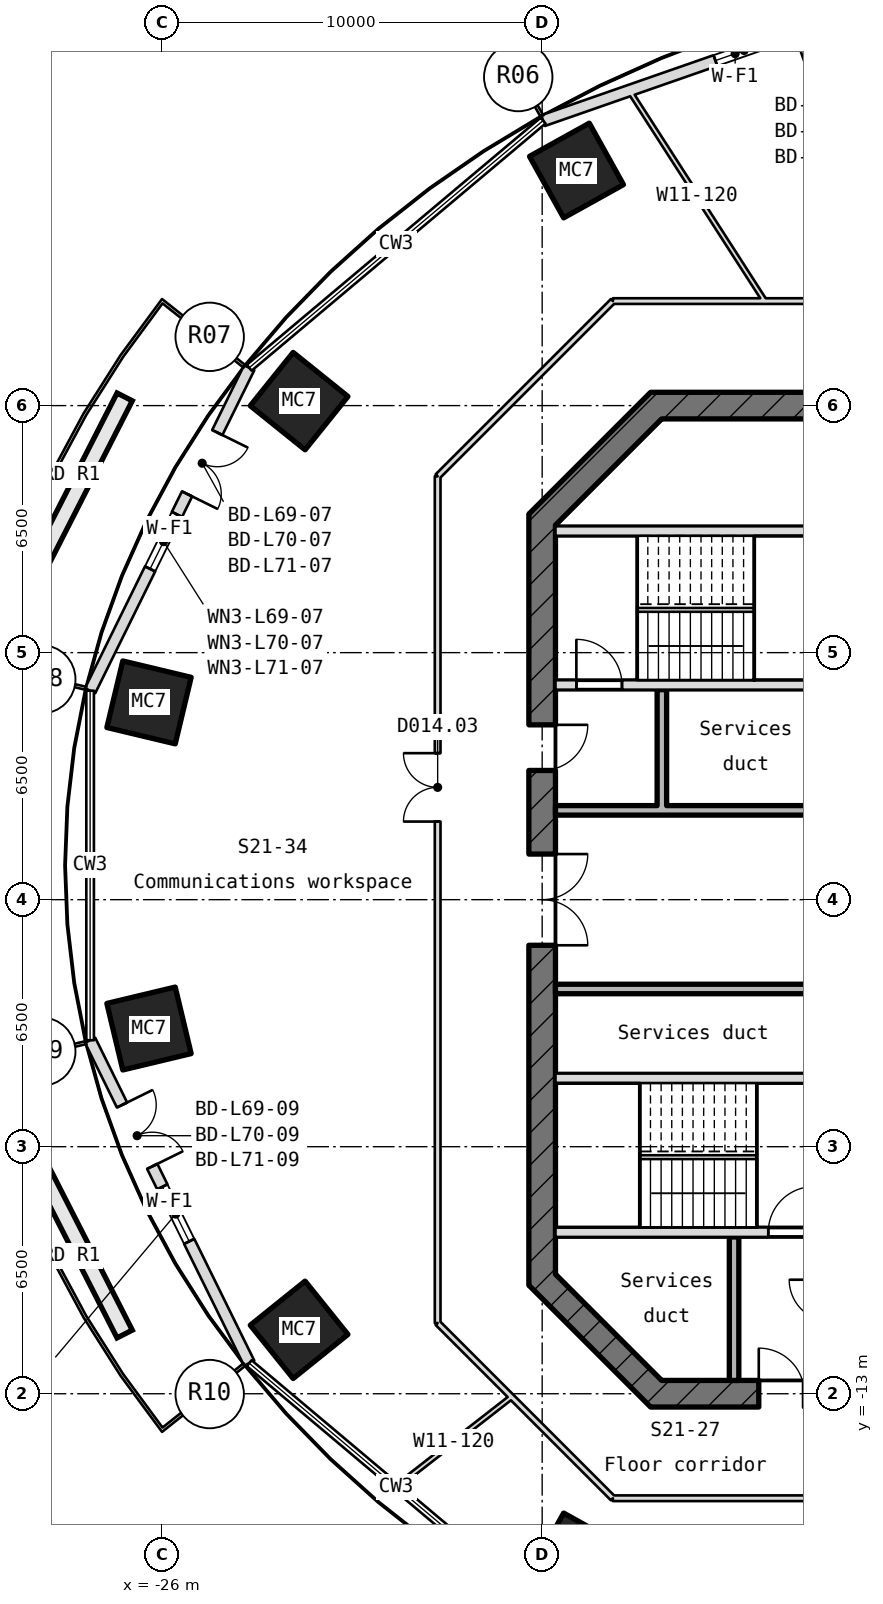
"""IFC4 building model, lengths in metres.
Left out: names, types, materials, properties, quantities, classifications, styles, units other than length and angle.
Written with IfcOpenShell. Run it as: python <this file> out.ifc"""

import sys

from ifc_helpers import new_model, si_unit, direction, frame, frame_2d, origin, origin_2d, place, context, subcontext, project, spatial, rectangle, hollow_rectangle, extrude, element, fill, save


model = new_model("IFC4")
c1 = context("Model", 3, precision=1e-05, world=origin(), true_north=direction((0.0, 1.0)))
c2 = subcontext(c1, "Body", "Model", "MODEL_VIEW")
j1 = project(units=[si_unit("LENGTHUNIT", "METRE"), si_unit("PLANEANGLEUNIT", "RADIAN")], contexts=[c1])
p1 = place(None, origin())
s1 = spatial("IfcSite", under=j1, at=p1, CompositionType="ELEMENT")
p2 = place(p1, origin())
s2 = spatial("IfcBuilding", under=s1, at=p2, CompositionType="ELEMENT")
p3 = place(p2, frame((0.0, 0.0, 309.4)))
s3 = spatial("IfcBuildingStorey", under=s2, at=p3, CompositionType="ELEMENT", Elevation=309.4)
for number, where, z_axis, x_axis in (
    (1, (-15.097, 19.186, -0.18), (0.0, 0.0, 1.0), (0.874, 0.486, 0.0)),
    (2, (-22.396, 13.118, -0.18), (0.0, 0.0, 1.0), (0.626, 0.779, 0.0)),
    (3, (-26.346, 5.19, -0.18), (0.0, 0.0, 1.0), (0.233, 0.973, 0.0)),
    (4, (-26.346, -3.39, -0.18), (0.0, 0.0, 1.0), (-0.233, 0.973, 0.0)),
    (5, (-22.396, -11.318, -0.18), (0.0, 0.0, 1.0), (-0.626, 0.779, 0.0)),
    (6, (-15.097, -17.386, -0.18), (0.0, 0.0, 1.0), (-0.874, 0.486, 0.0)),
):
    element("IfcColumn", number, at=place(p3, frame(where, z_axis=z_axis, x_axis=x_axis)), inside=s3, PredefinedType="COLUMN", context=c2, shape_type="SweptSolid", body=[
        extrude(hollow_rectangle(XDim=1.8, YDim=1.85, WallThickness=0.06, at=origin_2d()), origin(), (0.0, 0.0, 1.0), 4.15),
    ])
p4 = place(p3, frame((-5.869, 24.019, 0.0), z_axis=(0.0, 0.0, 1.0), x_axis=(-0.94436622093, -0.328895790132, 0.0)))
e7 = element("IfcWall", 7, at=p4, inside=s3, PredefinedType="SOLIDWALL", context=c2, shape_type="SweptSolid", body=[
    extrude(rectangle(XDim=10.701, YDim=0.3, at=frame_2d((5.351, 0.0))), origin(), (0.0, 0.0, 1.0), 3.97),
])
p5 = place(p4, frame((1.9, 0.0, 0.0)))
e8 = element("IfcOpeningElement", 8, at=p5, cuts=e7, PredefinedType="OPENING", context=c2, shape_type="SweptSolid", body=[
    extrude(rectangle(XDim=1.8, YDim=2.4, at=frame_2d((0.9, 1.2))), frame((0.0, 0.16, 0.0), z_axis=(0.0, -1.0, 0.0), x_axis=(1.0, 0.0, 0.0)), (0.0, 0.0, 1.0), 0.32),
])
p6 = place(p4, frame((4.3, 0.0, 0.9)))
e9 = element("IfcOpeningElement", 9, at=p6, cuts=e7, PredefinedType="OPENING", context=c2, shape_type="SweptSolid", body=[
    extrude(rectangle(XDim=1.6, YDim=1.5, at=frame_2d((0.8, 0.75))), frame((0.0, 0.16, 0.0), z_axis=(0.0, -1.0, 0.0), x_axis=(1.0, 0.0, 0.0)), (0.0, 0.0, 1.0), 0.32),
])
p7 = place(p3, frame((-23.709, 13.996, 0.0), z_axis=(0.0, 0.0, 1.0), x_axis=(-0.441906476931, -0.89706112704, 0.0)))
e10 = element("IfcWall", 10, at=p7, inside=s3, PredefinedType="SOLIDWALL", context=c2, shape_type="SweptSolid", body=[
    extrude(rectangle(XDim=9.472, YDim=0.3, at=frame_2d((4.736, 0.0))), origin(), (0.0, 0.0, 1.0), 3.97),
])
p8 = place(p7, frame((1.9, 0.0, 0.0)))
e11 = element("IfcOpeningElement", 11, at=p8, cuts=e10, PredefinedType="OPENING", context=c2, shape_type="SweptSolid", body=[
    extrude(rectangle(XDim=1.8, YDim=2.4, at=frame_2d((0.9, 1.2))), frame((0.0, 0.16, 0.0), z_axis=(0.0, -1.0, 0.0), x_axis=(1.0, 0.0, 0.0)), (0.0, 0.0, 1.0), 0.32),
])
p9 = place(p7, frame((4.3, 0.0, 0.9)))
e12 = element("IfcOpeningElement", 12, at=p9, cuts=e10, PredefinedType="OPENING", context=c2, shape_type="SweptSolid", body=[
    extrude(rectangle(XDim=1.6, YDim=1.5, at=frame_2d((0.8, 0.75))), frame((0.0, 0.16, 0.0), z_axis=(0.0, -1.0, 0.0), x_axis=(1.0, 0.0, 0.0)), (0.0, 0.0, 1.0), 0.32),
])
p10 = place(p3, frame((-27.895, -3.699, 0.0), z_axis=(0.0, 0.0, 1.0), x_axis=(0.441906476931, -0.89706112704, 0.0)))
e13 = element("IfcWall", 13, at=p10, inside=s3, PredefinedType="SOLIDWALL", context=c2, shape_type="SweptSolid", body=[
    extrude(rectangle(XDim=9.472, YDim=0.3, at=frame_2d((4.736, 0.0))), origin(), (0.0, 0.0, 1.0), 3.97),
])
p11 = place(p10, frame((1.9, 0.0, 0.0)))
e14 = element("IfcOpeningElement", 14, at=p11, cuts=e13, PredefinedType="OPENING", context=c2, shape_type="SweptSolid", body=[
    extrude(rectangle(XDim=1.8, YDim=2.4, at=frame_2d((0.9, 1.2))), frame((0.0, 0.16, 0.0), z_axis=(0.0, -1.0, 0.0), x_axis=(1.0, 0.0, 0.0)), (0.0, 0.0, 1.0), 0.32),
])
p12 = place(p10, frame((4.3, 0.0, 0.9)))
e15 = element("IfcOpeningElement", 15, at=p12, cuts=e13, PredefinedType="OPENING", context=c2, shape_type="SweptSolid", body=[
    extrude(rectangle(XDim=1.6, YDim=1.5, at=frame_2d((0.8, 0.75))), frame((0.0, 0.16, 0.0), z_axis=(0.0, -1.0, 0.0), x_axis=(1.0, 0.0, 0.0)), (0.0, 0.0, 1.0), 0.32),
])
p13 = place(p3, frame((13.145, 13.0, -0.18), z_axis=(0.0, 0.0, 1.0), x_axis=(-1.0, 0.0, 0.0)))
e16 = element("IfcWall", 16, at=p13, inside=s3, PredefinedType="SHEAR", context=c2, shape_type="SweptSolid", body=[
    extrude(rectangle(XDim=26.29, YDim=0.7, at=frame_2d((13.145, 0.0))), origin(), (0.0, 0.0, 1.0), 4.15),
])
p14 = place(p13, frame((21.073, 0.0, 0.18)))
e17 = element("IfcOpeningElement", 17, at=p14, cuts=e16, PredefinedType="OPENING", context=c2, shape_type="SweptSolid", body=[
    extrude(rectangle(XDim=1.0, YDim=2.1, at=frame_2d((0.5, 1.05))), frame((0.0, 0.36, 0.0), z_axis=(0.0, -1.0, 0.0), x_axis=(1.0, 0.0, 0.0)), (0.0, 0.0, 1.0), 0.72),
])
p15 = place(p13, frame((13.645, 0.0, 0.18)))
e18 = element("IfcOpeningElement", 18, at=p15, cuts=e16, PredefinedType="OPENING", context=c2, shape_type="SweptSolid", body=[
    extrude(rectangle(XDim=1.0, YDim=2.1, at=frame_2d((0.5, 1.05))), frame((0.0, 0.36, 0.0), z_axis=(0.0, -1.0, 0.0), x_axis=(1.0, 0.0, 0.0)), (0.0, 0.0, 1.0), 0.72),
])
p16 = place(p13, frame((7.395, 0.0, 0.18)))
e19 = element("IfcOpeningElement", 19, at=p16, cuts=e16, PredefinedType="OPENING", context=c2, shape_type="SweptSolid", body=[
    extrude(rectangle(XDim=1.0, YDim=2.1, at=frame_2d((0.5, 1.05))), frame((0.0, 0.36, 0.0), z_axis=(0.0, -1.0, 0.0), x_axis=(1.0, 0.0, 0.0)), (0.0, 0.0, 1.0), 0.72),
])
p17 = place(p13, frame((2.4, 0.0, 0.18)))
e20 = element("IfcOpeningElement", 20, at=p17, cuts=e16, PredefinedType="OPENING", context=c2, shape_type="SweptSolid", body=[
    extrude(rectangle(XDim=1.0, YDim=2.1, at=frame_2d((0.5, 1.05))), frame((0.0, 0.36, 0.0), z_axis=(0.0, -1.0, 0.0), x_axis=(1.0, 0.0, 0.0)), (0.0, 0.0, 1.0), 0.72),
])
p18 = place(p3, frame((-12.897, 13.103, -0.18), z_axis=(0.0, 0.0, 1.0), x_axis=(-0.707106781187, -0.707106781187, 0.0)))
e21 = element("IfcWall", 21, at=p18, inside=s3, PredefinedType="SHEAR", context=c2, shape_type="SweptSolid", body=[
    extrude(rectangle(XDim=4.533, YDim=0.7, at=frame_2d((2.266, 0.0))), origin(), (0.0, 0.0, 1.0), 4.15),
])
p19 = place(p3, frame((-16.0, 10.145, -0.18), z_axis=(0.0, 0.0, 1.0), x_axis=(0.0, -1.0, 0.0)))
e22 = element("IfcWall", 22, at=p19, inside=s3, PredefinedType="SHEAR", context=c2, shape_type="SweptSolid", body=[
    extrude(rectangle(XDim=20.29, YDim=0.7, at=frame_2d((10.145, 0.0))), origin(), (0.0, 0.0, 1.0), 4.15),
])
p20 = place(p19, frame((8.945, 0.0, 0.18)))
e23 = element("IfcOpeningElement", 23, at=p20, cuts=e22, PredefinedType="OPENING", context=c2, shape_type="SweptSolid", body=[
    extrude(rectangle(XDim=2.4, YDim=2.1, at=frame_2d((1.2, 1.05))), frame((0.0, 0.36, 0.0), z_axis=(0.0, -1.0, 0.0), x_axis=(1.0, 0.0, 0.0)), (0.0, 0.0, 1.0), 0.72),
])
p21 = place(p19, frame((5.545, 0.0, 0.18)))
e24 = element("IfcOpeningElement", 24, at=p21, cuts=e22, PredefinedType="OPENING", context=c2, shape_type="SweptSolid", body=[
    extrude(rectangle(XDim=1.2, YDim=2.1, at=frame_2d((0.6, 1.05))), frame((0.0, 0.36, 0.0), z_axis=(0.0, -1.0, 0.0), x_axis=(1.0, 0.0, 0.0)), (0.0, 0.0, 1.0), 0.72),
])
p22 = place(p3, frame((-16.103, -9.897, -0.18), z_axis=(0.0, 0.0, 1.0), x_axis=(0.707106781187, -0.707106781187, 0.0)))
e25 = element("IfcWall", 25, at=p22, inside=s3, PredefinedType="SHEAR", context=c2, shape_type="SweptSolid", body=[
    extrude(rectangle(XDim=4.533, YDim=0.7, at=frame_2d((2.266, 0.0))), origin(), (0.0, 0.0, 1.0), 4.15),
])
p23 = place(p3, frame((-13.145, -13.0, -0.18), z_axis=(0.0, 0.0, 1.0), x_axis=(1.0, 0.0, 0.0)))
e26 = element("IfcWall", 26, at=p23, inside=s3, PredefinedType="SHEAR", context=c2, shape_type="SweptSolid", body=[
    extrude(rectangle(XDim=26.29, YDim=0.7, at=frame_2d((13.145, 0.0))), origin(), (0.0, 0.0, 1.0), 4.15),
])
p24 = place(p23, frame((2.845, 0.0, 0.18)))
e27 = element("IfcOpeningElement", 27, at=p24, cuts=e26, PredefinedType="OPENING", context=c2, shape_type="SweptSolid", body=[
    extrude(rectangle(XDim=1.2, YDim=2.1, at=frame_2d((0.6, 1.05))), frame((0.0, 0.36, 0.0), z_axis=(0.0, -1.0, 0.0), x_axis=(1.0, 0.0, 0.0)), (0.0, 0.0, 1.0), 0.72),
])
p25 = place(p23, frame((6.845, 0.0, 0.18)))
e28 = element("IfcOpeningElement", 28, at=p25, cuts=e26, PredefinedType="OPENING", context=c2, shape_type="SweptSolid", body=[
    extrude(rectangle(XDim=1.4, YDim=2.1, at=frame_2d((0.7, 1.05))), frame((0.0, 0.36, 0.0), z_axis=(0.0, -1.0, 0.0), x_axis=(1.0, 0.0, 0.0)), (0.0, 0.0, 1.0), 0.72),
])
p26 = place(p23, frame((15.445, 0.0, 0.18)))
e29 = element("IfcOpeningElement", 29, at=p26, cuts=e26, PredefinedType="OPENING", context=c2, shape_type="SweptSolid", body=[
    extrude(rectangle(XDim=1.4, YDim=2.1, at=frame_2d((0.7, 1.05))), frame((0.0, 0.36, 0.0), z_axis=(0.0, -1.0, 0.0), x_axis=(1.0, 0.0, 0.0)), (0.0, 0.0, 1.0), 0.72),
])
p27 = place(p3, frame((-15.65, -8.75, -0.18), z_axis=(0.0, 0.0, 1.0), x_axis=(1.0, 0.0, 0.0)))
e30 = element("IfcWall", 30, at=p27, inside=s3, PredefinedType="SHEAR", context=c2, shape_type="SweptSolid", body=[
    extrude(rectangle(XDim=7.1, YDim=0.25, at=frame_2d((3.55, 0.0))), origin(), (0.0, 0.0, 1.0), 4.15),
])
p28 = place(p27, frame((5.6, 0.0, 0.18)))
e31 = element("IfcOpeningElement", 31, at=p28, cuts=e30, PredefinedType="OPENING", context=c2, shape_type="SweptSolid", body=[
    extrude(rectangle(XDim=1.2, YDim=2.1, at=frame_2d((0.6, 1.05))), frame((0.0, 0.135, 0.0), z_axis=(0.0, -1.0, 0.0), x_axis=(1.0, 0.0, 0.0)), (0.0, 0.0, 1.0), 0.27),
])
p29 = place(p3, frame((-15.65, -4.7, -0.18), z_axis=(0.0, 0.0, 1.0), x_axis=(1.0, 0.0, 0.0)))
e32 = element("IfcWall", 32, at=p29, inside=s3, PredefinedType="SHEAR", context=c2, shape_type="SweptSolid", body=[
    extrude(rectangle(XDim=7.1, YDim=0.25, at=frame_2d((3.55, 0.0))), origin(), (0.0, 0.0, 1.0), 4.15),
])
for number, where, z_axis, x_axis in (
    (33, (-15.65, -2.35, 0.0), (0.0, 0.0, 1.0), (1.0, 0.0, 0.0)),
    (34, (-15.65, 2.35, 0.0), (0.0, 0.0, 1.0), (1.0, 0.0, 0.0)),
):
    element("IfcWall", number, at=place(p3, frame(where, z_axis=z_axis, x_axis=x_axis)), inside=s3, PredefinedType="STANDARD", context=c2, shape_type="SweptSolid", body=[
        extrude(rectangle(XDim=7.25, YDim=0.25, at=frame_2d((3.625, 0.0))), origin(), (0.0, 0.0, 1.0), 3.97),
    ])
p30 = place(p3, frame((-15.65, 5.65, -0.18), z_axis=(0.0, 0.0, 1.0), x_axis=(1.0, 0.0, 0.0)))
e35 = element("IfcWall", 35, at=p30, inside=s3, PredefinedType="SHEAR", context=c2, shape_type="SweptSolid", body=[
    extrude(rectangle(XDim=7.1, YDim=0.25, at=frame_2d((3.55, 0.0))), origin(), (0.0, 0.0, 1.0), 4.15),
])
p31 = place(p30, frame((0.55, 0.0, 0.18)))
e36 = element("IfcOpeningElement", 36, at=p31, cuts=e35, PredefinedType="OPENING", context=c2, shape_type="SweptSolid", body=[
    extrude(rectangle(XDim=1.2, YDim=2.1, at=frame_2d((0.6, 1.05))), frame((0.0, 0.135, 0.0), z_axis=(0.0, -1.0, 0.0), x_axis=(1.0, 0.0, 0.0)), (0.0, 0.0, 1.0), 0.27),
])
p32 = place(p3, frame((-15.65, 9.7, -0.18), z_axis=(0.0, 0.0, 1.0), x_axis=(1.0, 0.0, 0.0)))
e37 = element("IfcWall", 37, at=p32, inside=s3, PredefinedType="SHEAR", context=c2, shape_type="SweptSolid", body=[
    extrude(rectangle(XDim=7.1, YDim=0.25, at=frame_2d((3.55, 0.0))), origin(), (0.0, 0.0, 1.0), 4.15),
])
p33 = place(p3, frame((-12.85, 2.475, 0.0), z_axis=(0.0, 0.0, 1.0), x_axis=(0.0, 1.0, 0.0)))
e38 = element("IfcWall", 38, at=p33, inside=s3, PredefinedType="STANDARD", context=c2, shape_type="SweptSolid", body=[
    extrude(rectangle(XDim=3.05, YDim=0.25, at=frame_2d((1.525, 0.0))), origin(), (0.0, 0.0, 1.0), 3.97),
])
p34 = place(p3, frame((-10.95, -12.65, 0.0), z_axis=(0.0, 0.0, 1.0), x_axis=(0.0, 1.0, 0.0)))
e39 = element("IfcWall", 39, at=p34, inside=s3, PredefinedType="STANDARD", context=c2, shape_type="SweptSolid", body=[
    extrude(rectangle(XDim=3.775, YDim=0.25, at=frame_2d((1.887, 0.0))), origin(), (0.0, 0.0, 1.0), 3.97),
])
p35 = place(p3, frame((-18.75, -11.139, 0.0), z_axis=(0.0, 0.0, 1.0), x_axis=(0.0, 1.0, 0.0)))
e40 = element("IfcWall", 40, at=p35, inside=s3, PredefinedType="PARTITIONING", context=c2, shape_type="SweptSolid", body=[
    extrude(rectangle(XDim=22.278, YDim=0.15, at=frame_2d((11.139, 0.0))), origin(), (0.0, 0.0, 1.0), 3.97),
])
p36 = place(p35, frame((13.194, 0.0, 0.0)))
e41 = element("IfcOpeningElement", 41, at=p36, cuts=e40, PredefinedType="OPENING", context=c2, shape_type="SweptSolid", body=[
    extrude(rectangle(XDim=1.8, YDim=2.1, at=frame_2d((0.9, 1.05))), frame((0.0, 0.085, 0.0), z_axis=(0.0, -1.0, 0.0), x_axis=(1.0, 0.0, 0.0)), (0.0, 0.0, 1.0), 0.17),
])
p37 = place(p3, frame((-18.75, 11.139, 0.0), z_axis=(0.0, 0.0, 1.0), x_axis=(0.707106781187, 0.707106781187, 0.0)))
e42 = element("IfcWall", 42, at=p37, inside=s3, PredefinedType="PARTITIONING", context=c2, shape_type="SweptSolid", body=[
    extrude(rectangle(XDim=6.521, YDim=0.15, at=frame_2d((3.26, 0.0))), origin(), (0.0, 0.0, 1.0), 3.97),
])
p38 = place(p3, frame((-16.805, -13.083, 0.0), z_axis=(0.0, 0.0, 1.0), x_axis=(-0.789044686995, -0.614335805504, 0.0)))
e43 = element("IfcWall", 43, at=p38, inside=s3, PredefinedType="PARTITIONING", context=c2, shape_type="SweptSolid", body=[
    extrude(rectangle(XDim=3.848, YDim=0.12, at=frame_2d((1.924, 0.0))), origin(), (0.0, 0.0, 1.0), 3.97),
])
p39 = place(p3, frame((-14.139, -15.75, 0.0), z_axis=(0.0, 0.0, 1.0), x_axis=(-0.707106781187, 0.707106781187, 0.0)))
e44 = element("IfcWall", 44, at=p39, inside=s3, PredefinedType="PARTITIONING", context=c2, shape_type="SweptSolid", body=[
    extrude(rectangle(XDim=6.521, YDim=0.15, at=frame_2d((3.26, 0.0))), origin(), (0.0, 0.0, 1.0), 3.97),
])
p40 = place(p3, frame((-14.139, 15.75, 0.0), z_axis=(0.0, 0.0, 1.0), x_axis=(1.0, 0.0, 0.0)))
e45 = element("IfcWall", 45, at=p40, inside=s3, PredefinedType="PARTITIONING", context=c2, shape_type="SweptSolid", body=[
    extrude(rectangle(XDim=28.278, YDim=0.15, at=frame_2d((14.139, 0.0))), origin(), (0.0, 0.0, 1.0), 3.97),
])
p41 = place(p40, frame((24.848, 0.0, 0.0)))
e46 = element("IfcOpeningElement", 46, at=p41, cuts=e45, PredefinedType="OPENING", context=c2, shape_type="SweptSolid", body=[
    extrude(rectangle(XDim=0.95, YDim=2.1, at=frame_2d((0.475, 1.05))), frame((0.0, 0.085, 0.0), z_axis=(0.0, -1.0, 0.0), x_axis=(1.0, 0.0, 0.0)), (0.0, 0.0, 1.0), 0.17),
])
p42 = place(p40, frame((19.841, 0.0, 0.0)))
e47 = element("IfcOpeningElement", 47, at=p42, cuts=e45, PredefinedType="OPENING", context=c2, shape_type="SweptSolid", body=[
    extrude(rectangle(XDim=1.8, YDim=2.1, at=frame_2d((0.9, 1.05))), frame((0.0, 0.085, 0.0), z_axis=(0.0, -1.0, 0.0), x_axis=(1.0, 0.0, 0.0)), (0.0, 0.0, 1.0), 0.17),
])
p43 = place(p40, frame((10.656, 0.0, 0.0)))
e48 = element("IfcOpeningElement", 48, at=p43, cuts=e45, PredefinedType="OPENING", context=c2, shape_type="SweptSolid", body=[
    extrude(rectangle(XDim=1.8, YDim=2.1, at=frame_2d((0.9, 1.05))), frame((0.0, 0.085, 0.0), z_axis=(0.0, -1.0, 0.0), x_axis=(1.0, 0.0, 0.0)), (0.0, 0.0, 1.0), 0.17),
])
p44 = place(p3, frame((-10.141, 15.75, 0.0), z_axis=(0.0, 0.0, 1.0), x_axis=(-0.541399884667, 0.840765225781, 0.0)))
e49 = element("IfcWall", 49, at=p44, inside=s3, PredefinedType="PARTITIONING", context=c2, shape_type="SweptSolid", body=[
    extrude(rectangle(XDim=6.588, YDim=0.12, at=frame_2d((3.294, 0.0))), origin(), (0.0, 0.0, 1.0), 3.97),
])
p45 = place(p3, frame((14.139, -15.75, 0.0), z_axis=(0.0, 0.0, 1.0), x_axis=(-1.0, 0.0, 0.0)))
e50 = element("IfcWall", 50, at=p45, inside=s3, PredefinedType="PARTITIONING", context=c2, shape_type="SweptSolid", body=[
    extrude(rectangle(XDim=28.278, YDim=0.15, at=frame_2d((14.139, 0.0))), origin(), (0.0, 0.0, 1.0), 3.97),
])
p46 = place(p45, frame((15.518, 0.0, 0.0)))
e51 = element("IfcOpeningElement", 51, at=p46, cuts=e50, PredefinedType="OPENING", context=c2, shape_type="SweptSolid", body=[
    extrude(rectangle(XDim=0.95, YDim=2.1, at=frame_2d((0.475, 1.05))), frame((0.0, 0.085, 0.0), z_axis=(0.0, -1.0, 0.0), x_axis=(1.0, 0.0, 0.0)), (0.0, 0.0, 1.0), 0.17),
])
p47 = place(p6, origin())
e52 = element("IfcWindow", 52, at=p47, inside=s3, PartitioningType="SINGLE_PANEL", PredefinedType="WINDOW", context=c2, shape_type="SweptSolid", body=[
    extrude(rectangle(XDim=1.6, YDim=1.5, at=frame_2d((0.8, 0.75))), frame((0.0, 0.03, 0.0), z_axis=(0.0, -1.0, 0.0), x_axis=(1.0, 0.0, 0.0)), (0.0, 0.0, 1.0), 0.06),
])
fill(e9, e52)
p48 = place(p8, origin())
e53 = element("IfcDoor", 53, at=p48, inside=s3, OperationType="SINGLE_SWING_LEFT", PredefinedType="DOOR", context=c2, shape_type="SweptSolid", body=[
    extrude(rectangle(XDim=1.8, YDim=2.4, at=frame_2d((0.9, 1.2))), frame((0.0, 0.025, 0.0), z_axis=(0.0, -1.0, 0.0), x_axis=(1.0, 0.0, 0.0)), (0.0, 0.0, 1.0), 0.05),
])
fill(e11, e53)
p49 = place(p9, origin())
e54 = element("IfcWindow", 54, at=p49, inside=s3, PartitioningType="SINGLE_PANEL", PredefinedType="WINDOW", context=c2, shape_type="SweptSolid", body=[
    extrude(rectangle(XDim=1.6, YDim=1.5, at=frame_2d((0.8, 0.75))), frame((0.0, 0.03, 0.0), z_axis=(0.0, -1.0, 0.0), x_axis=(1.0, 0.0, 0.0)), (0.0, 0.0, 1.0), 0.06),
])
fill(e12, e54)
p50 = place(p11, origin())
e55 = element("IfcDoor", 55, at=p50, inside=s3, OperationType="SINGLE_SWING_LEFT", PredefinedType="DOOR", context=c2, shape_type="SweptSolid", body=[
    extrude(rectangle(XDim=1.8, YDim=2.4, at=frame_2d((0.9, 1.2))), frame((0.0, 0.025, 0.0), z_axis=(0.0, -1.0, 0.0), x_axis=(1.0, 0.0, 0.0)), (0.0, 0.0, 1.0), 0.05),
])
fill(e14, e55)
p51 = place(p12, origin())
e56 = element("IfcWindow", 56, at=p51, inside=s3, PartitioningType="SINGLE_PANEL", PredefinedType="WINDOW", context=c2, shape_type="SweptSolid", body=[
    extrude(rectangle(XDim=1.6, YDim=1.5, at=frame_2d((0.8, 0.75))), frame((0.0, 0.03, 0.0), z_axis=(0.0, -1.0, 0.0), x_axis=(1.0, 0.0, 0.0)), (0.0, 0.0, 1.0), 0.06),
])
fill(e15, e56)
p52 = place(p31, origin())
e57 = element("IfcDoor", 57, at=p52, inside=s3, OperationType="SINGLE_SWING_RIGHT", PredefinedType="DOOR", context=c2, shape_type="SweptSolid", body=[
    extrude(rectangle(XDim=1.2, YDim=2.1, at=frame_2d((0.6, 1.05))), frame((0.0, 0.025, 0.0), z_axis=(0.0, -1.0, 0.0), x_axis=(1.0, 0.0, 0.0)), (0.0, 0.0, 1.0), 0.05),
])
fill(e36, e57)
p53 = place(p28, origin())
e58 = element("IfcDoor", 58, at=p53, inside=s3, OperationType="SINGLE_SWING_RIGHT", PredefinedType="DOOR", context=c2, shape_type="SweptSolid", body=[
    extrude(rectangle(XDim=1.2, YDim=2.1, at=frame_2d((0.6, 1.05))), frame((0.0, 0.025, 0.0), z_axis=(0.0, -1.0, 0.0), x_axis=(1.0, 0.0, 0.0)), (0.0, 0.0, 1.0), 0.05),
])
fill(e31, e58)
p54 = place(p20, origin())
e59 = element("IfcDoor", 59, at=p54, inside=s3, OperationType="DOUBLE_DOOR_SINGLE_SWING", PredefinedType="DOOR", context=c2, shape_type="SweptSolid", body=[
    extrude(rectangle(XDim=2.4, YDim=2.1, at=frame_2d((1.2, 1.05))), frame((0.0, 0.025, 0.0), z_axis=(0.0, -1.0, 0.0), x_axis=(1.0, 0.0, 0.0)), (0.0, 0.0, 1.0), 0.05),
])
fill(e23, e59)
p55 = place(p21, origin())
e60 = element("IfcDoor", 60, at=p55, inside=s3, OperationType="SINGLE_SWING_RIGHT", PredefinedType="DOOR", context=c2, shape_type="SweptSolid", body=[
    extrude(rectangle(XDim=1.2, YDim=2.1, at=frame_2d((0.6, 1.05))), frame((0.0, 0.025, 0.0), z_axis=(0.0, -1.0, 0.0), x_axis=(1.0, 0.0, 0.0)), (0.0, 0.0, 1.0), 0.05),
])
fill(e24, e60)
p56 = place(p24, origin())
e61 = element("IfcDoor", 61, at=p56, inside=s3, OperationType="SINGLE_SWING_RIGHT", PredefinedType="DOOR", context=c2, shape_type="SweptSolid", body=[
    extrude(rectangle(XDim=1.2, YDim=2.1, at=frame_2d((0.6, 1.05))), frame((0.0, 0.025, 0.0), z_axis=(0.0, -1.0, 0.0), x_axis=(1.0, 0.0, 0.0)), (0.0, 0.0, 1.0), 0.05),
])
fill(e27, e61)
p57 = place(p36, origin())
e62 = element("IfcDoor", 62, at=p57, inside=s3, OperationType="DOUBLE_DOOR_SINGLE_SWING", PredefinedType="DOOR", context=c2, shape_type="SweptSolid", body=[
    extrude(rectangle(XDim=1.8, YDim=2.1, at=frame_2d((0.9, 1.05))), frame((0.0, 0.025, 0.0), z_axis=(0.0, -1.0, 0.0), x_axis=(1.0, 0.0, 0.0)), (0.0, 0.0, 1.0), 0.05),
])
fill(e41, e62)
save(model, sys.argv[1])
